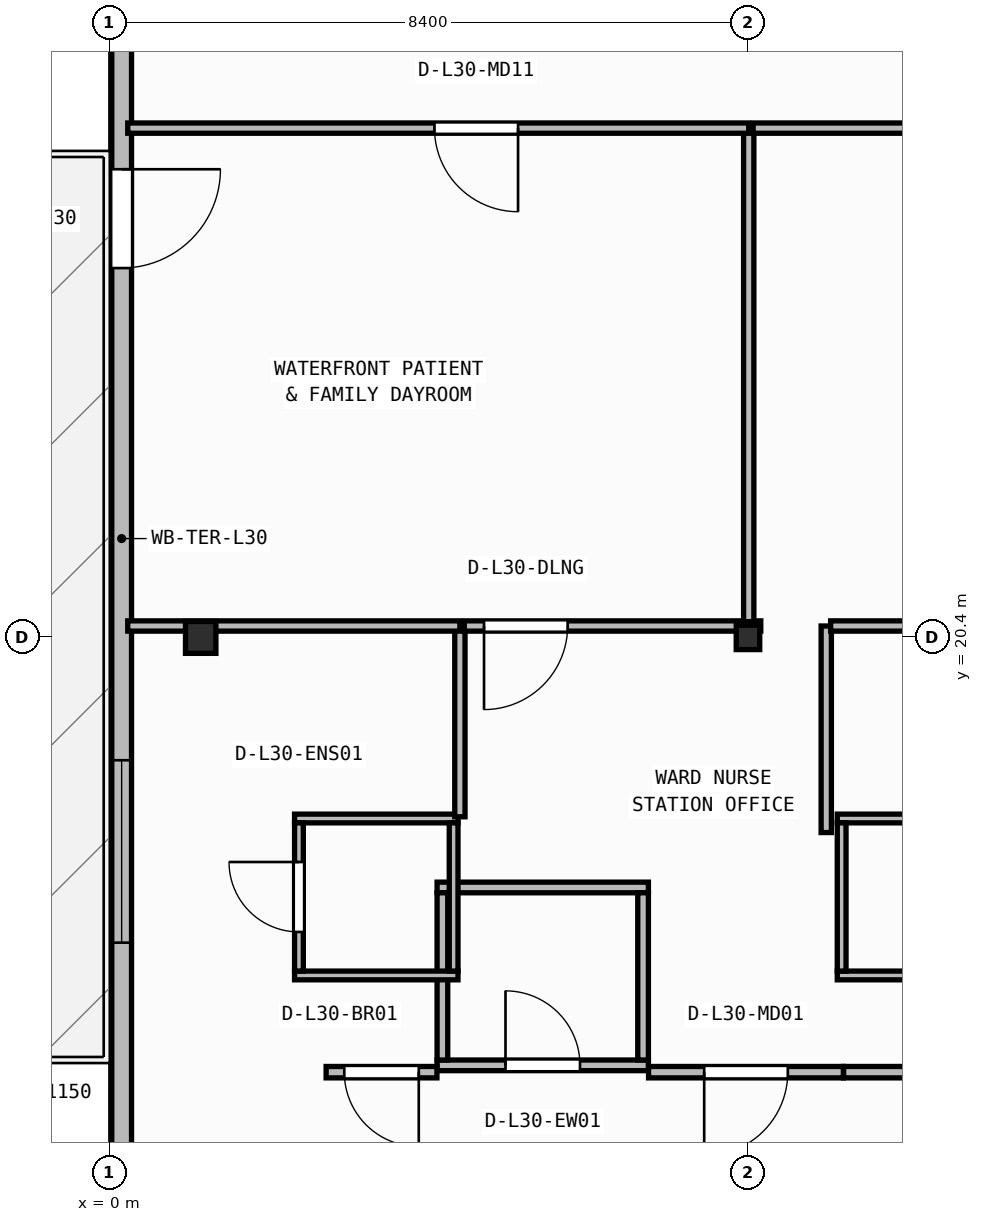
"""IFC4 building model, lengths in metres.
Left out: names, types, materials, properties, quantities, classifications, styles, units other than length and angle.
Written with IfcOpenShell. Run it as: python <this file> out.ifc"""

import sys

from ifc_helpers import new_model, si_unit, direction, frame, frame_2d, origin, origin_2d, place, context, subcontext, project, spatial, rectangle, i_section, extrude, element, fill, save


model = new_model("IFC4")
c1 = context("Model", 3, precision=1e-05, world=origin(), true_north=direction((0.0, 1.0)))
c2 = subcontext(c1, "Body", "Model", "MODEL_VIEW")
j1 = project(units=[si_unit("LENGTHUNIT", "METRE"), si_unit("PLANEANGLEUNIT", "RADIAN")], contexts=[c1])
p1 = place(None, origin())
s1 = spatial("IfcSite", under=j1, at=p1, CompositionType="ELEMENT")
p2 = place(p1, origin())
s2 = spatial("IfcBuilding", under=s1, at=p2, CompositionType="ELEMENT")
p3 = place(p2, frame((0.0, 0.0, 123.1)))
s3 = spatial("IfcBuildingStorey", under=s2, at=p3, CompositionType="ELEMENT", Elevation=123.1)
p4 = place(p3, frame((1.2, 20.4, 0.0), z_axis=(0.0, 0.0, 1.0), x_axis=(1.0, 0.0, 0.0)))
e1 = element("IfcColumn", 1, at=p4, inside=s3, PredefinedType="COLUMN", context=c2, shape_type="SweptSolid", body=[
    extrude(i_section(OverallWidth=0.4, OverallDepth=0.42, WebThickness=0.025, FlangeThickness=0.04, at=origin_2d()), origin(), (0.0, 0.0, 1.0), 3.95),
])
p5 = place(p3, frame((8.4, 20.4, 0.0), z_axis=(0.0, 0.0, 1.0), x_axis=(1.0, 0.0, 0.0)))
e2 = element("IfcColumn", 2, at=p5, inside=s3, PredefinedType="COLUMN", context=c2, shape_type="SweptSolid", body=[
    extrude(i_section(OverallWidth=0.309, OverallDepth=0.321, WebThickness=0.014, FlangeThickness=0.022, FilletRadius=0.017, at=origin_2d()), origin(), (0.0, 0.0, 1.0), 3.95),
])
p6 = place(p3, frame((0.16, 40.64, 0.0), z_axis=(0.0, 0.0, 1.0), x_axis=(0.0, -1.0, 0.0)))
e3 = element("IfcWall", 3, at=p6, inside=s3, PredefinedType="STANDARD", context=c2, shape_type="SweptSolid", body=[
    extrude(rectangle(XDim=37.88, YDim=0.26, at=frame_2d((18.94, 0.0))), origin(), (0.0, 0.0, 1.0), 3.71),
])
p7 = place(p6, frame((14.081, 0.0, 0.0)))
e4 = element("IfcOpeningElement", 4, at=p7, cuts=e3, PredefinedType="OPENING", context=c2, shape_type="SweptSolid", body=[
    extrude(rectangle(XDim=1.3, YDim=2.15, at=frame_2d((0.65, 1.075))), frame((0.0, 0.14, 0.0), z_axis=(0.0, -1.0, 0.0), x_axis=(1.0, 0.0, 0.0)), (0.0, 0.0, 1.0), 0.28),
])
p8 = place(p6, frame((21.856, 0.0, 0.9)))
e5 = element("IfcOpeningElement", 5, at=p8, cuts=e3, PredefinedType="OPENING", context=c2, shape_type="SweptSolid", body=[
    extrude(rectangle(XDim=2.4, YDim=1.65, at=frame_2d((1.2, 0.825))), frame((0.0, 0.14, 0.0), z_axis=(0.0, -1.0, 0.0), x_axis=(1.0, 0.0, 0.0)), (0.0, 0.0, 1.0), 0.28),
])
p9 = place(p3, frame((4.31, 14.77, 0.0), z_axis=(0.0, 0.0, 1.0), x_axis=(1.0, 0.0, 0.0)))
e6 = element("IfcWall", 6, at=p9, inside=s3, PredefinedType="PARTITIONING", context=c2, shape_type="SweptSolid", body=[
    extrude(rectangle(XDim=2.78, YDim=0.14, at=frame_2d((1.39, 0.0))), origin(), (0.0, 0.0, 1.0), 3.71),
])
p10 = place(p9, frame((0.9, 0.0, 0.0)))
e7 = element("IfcOpeningElement", 7, at=p10, cuts=e6, PredefinedType="OPENING", context=c2, shape_type="SweptSolid", body=[
    extrude(rectangle(XDim=0.98, YDim=2.1, at=frame_2d((0.49, 1.05))), frame((0.0, 0.08, 0.0), z_axis=(0.0, -1.0, 0.0), x_axis=(1.0, 0.0, 0.0)), (0.0, 0.0, 1.0), 0.16),
])
p11 = place(p3, frame((4.31, 17.11, 0.0), z_axis=(0.0, 0.0, 1.0), x_axis=(1.0, 0.0, 0.0)))
e8 = element("IfcWall", 8, at=p11, inside=s3, PredefinedType="PARTITIONING", context=c2, shape_type="SweptSolid", body=[
    extrude(rectangle(XDim=2.78, YDim=0.14, at=frame_2d((1.39, 0.0))), origin(), (0.0, 0.0, 1.0), 3.71),
])
for number, where, z_axis, x_axis in (
    (9, (4.38, 14.84, 0.0), (0.0, 0.0, 1.0), (0.0, 1.0, 0.0)),
    (10, (7.02, 14.84, 0.0), (0.0, 0.0, 1.0), (0.0, 1.0, 0.0)),
):
    element("IfcWall", number, at=place(p3, frame(where, z_axis=z_axis, x_axis=x_axis)), inside=s3, PredefinedType="PARTITIONING", context=c2, shape_type="SweptSolid", body=[
        extrude(rectangle(XDim=2.2, YDim=0.14, at=frame_2d((1.1, 0.0))), origin(), (0.0, 0.0, 1.0), 3.71),
    ])
for number, where, z_axis, x_axis in (
    (11, (2.435, 15.952, 0.0), (0.0, 0.0, 1.0), (1.0, 0.0, 0.0)),
    (12, (2.435, 18.018, 0.0), (0.0, 0.0, 1.0), (1.0, 0.0, 0.0)),
):
    element("IfcWall", number, at=place(p3, frame(where, z_axis=z_axis, x_axis=x_axis)), inside=s3, PredefinedType="PARTITIONING", context=c2, shape_type="SweptSolid", body=[
        extrude(rectangle(XDim=2.15, YDim=0.115, at=frame_2d((1.075, 0.0))), origin(), (0.0, 0.0, 1.0), 3.71),
    ])
p12 = place(p3, frame((2.492, 16.01, 0.0), z_axis=(0.0, 0.0, 1.0), x_axis=(0.0, 1.0, 0.0)))
e13 = element("IfcWall", 13, at=p12, inside=s3, PredefinedType="PARTITIONING", context=c2, shape_type="SweptSolid", body=[
    extrude(rectangle(XDim=1.95, YDim=0.115, at=frame_2d((0.975, 0.0))), origin(), (0.0, 0.0, 1.0), 3.71),
])
p13 = place(p12, frame((0.515, 0.0, 0.0)))
e14 = element("IfcOpeningElement", 14, at=p13, cuts=e13, PredefinedType="OPENING", context=c2, shape_type="SweptSolid", body=[
    extrude(rectangle(XDim=0.92, YDim=2.1, at=frame_2d((0.46, 1.05))), frame((0.0, 0.067, 0.0), z_axis=(0.0, -1.0, 0.0), x_axis=(1.0, 0.0, 0.0)), (0.0, 0.0, 1.0), 0.135),
])
p14 = place(p3, frame((4.528, 16.01, 0.0), z_axis=(0.0, 0.0, 1.0), x_axis=(0.0, 1.0, 0.0)))
e15 = element("IfcWall", 15, at=p14, inside=s3, PredefinedType="PARTITIONING", context=c2, shape_type="SweptSolid", body=[
    extrude(rectangle(XDim=1.95, YDim=0.115, at=frame_2d((0.975, 0.0))), origin(), (0.0, 0.0, 1.0), 3.71),
])
for number, where, z_axis, x_axis in (
    (16, (9.575, 15.952, 0.0), (0.0, 0.0, 1.0), (1.0, 0.0, 0.0)),
    (17, (9.575, 18.018, 0.0), (0.0, 0.0, 1.0), (1.0, 0.0, 0.0)),
):
    element("IfcWall", number, at=place(p3, frame(where, z_axis=z_axis, x_axis=x_axis)), inside=s3, PredefinedType="PARTITIONING", context=c2, shape_type="SweptSolid", body=[
        extrude(rectangle(XDim=2.15, YDim=0.115, at=frame_2d((1.075, 0.0))), origin(), (0.0, 0.0, 1.0), 3.71),
    ])
p15 = place(p3, frame((9.633, 16.01, 0.0), z_axis=(0.0, 0.0, 1.0), x_axis=(0.0, 1.0, 0.0)))
e18 = element("IfcWall", 18, at=p15, inside=s3, PredefinedType="PARTITIONING", context=c2, shape_type="SweptSolid", body=[
    extrude(rectangle(XDim=1.95, YDim=0.115, at=frame_2d((0.975, 0.0))), origin(), (0.0, 0.0, 1.0), 3.71),
])
p16 = place(p3, frame((4.308, 14.68, 0.0), z_axis=(0.0, 0.0, 1.0), x_axis=(-1.0, 0.0, 0.0)))
e19 = element("IfcWall", 19, at=p16, inside=s3, PredefinedType="PARTITIONING", context=c2, shape_type="SweptSolid", body=[
    extrude(rectangle(XDim=1.458, YDim=0.15, at=frame_2d((0.729, 0.0))), origin(), (0.0, 0.0, 1.0), 3.71),
])
p17 = place(p16, frame((0.239, 0.0, 0.0)))
e20 = element("IfcOpeningElement", 20, at=p17, cuts=e19, PredefinedType="OPENING", context=c2, shape_type="SweptSolid", body=[
    extrude(rectangle(XDim=0.98, YDim=2.1, at=frame_2d((0.49, 1.05))), frame((0.0, 0.085, 0.0), z_axis=(0.0, -1.0, 0.0), x_axis=(1.0, 0.0, 0.0)), (0.0, 0.0, 1.0), 0.17),
])
p18 = place(p3, frame((9.656, 14.68, 0.0), z_axis=(0.0, 0.0, 1.0), x_axis=(-1.0, 0.0, 0.0)))
e21 = element("IfcWall", 21, at=p18, inside=s3, PredefinedType="PARTITIONING", context=c2, shape_type="SweptSolid", body=[
    extrude(rectangle(XDim=2.564, YDim=0.15, at=frame_2d((1.282, 0.0))), origin(), (0.0, 0.0, 1.0), 3.71),
])
p19 = place(p18, frame((0.732, 0.0, 0.0)))
e22 = element("IfcOpeningElement", 22, at=p19, cuts=e21, PredefinedType="OPENING", context=c2, shape_type="SweptSolid", body=[
    extrude(rectangle(XDim=1.1, YDim=2.1, at=frame_2d((0.55, 1.05))), frame((0.0, 0.085, 0.0), z_axis=(0.0, -1.0, 0.0), x_axis=(1.0, 0.0, 0.0)), (0.0, 0.0, 1.0), 0.17),
])
p20 = place(p3, frame((14.856, 14.68, 0.0), z_axis=(0.0, 0.0, 1.0), x_axis=(-1.0, 0.0, 0.0)))
e23 = element("IfcWall", 23, at=p20, inside=s3, PredefinedType="PARTITIONING", context=c2, shape_type="SweptSolid", body=[
    extrude(rectangle(XDim=5.198, YDim=0.15, at=frame_2d((2.599, 0.0))), origin(), (0.0, 0.0, 1.0), 3.71),
])
p21 = place(p20, frame((1.949, 0.0, 0.0)))
e24 = element("IfcOpeningElement", 24, at=p21, cuts=e23, PredefinedType="OPENING", context=c2, shape_type="SweptSolid", body=[
    extrude(rectangle(XDim=1.3, YDim=2.15, at=frame_2d((0.65, 1.075))), frame((0.0, 0.085, 0.0), z_axis=(0.0, -1.0, 0.0), x_axis=(1.0, 0.0, 0.0)), (0.0, 0.0, 1.0), 0.17),
])
p22 = place(p3, frame((4.61, 18.04, 0.0), z_axis=(0.0, 0.0, 1.0), x_axis=(0.0, 1.0, 0.0)))
e25 = element("IfcWall", 25, at=p22, inside=s3, PredefinedType="PARTITIONING", context=c2, shape_type="SweptSolid", body=[
    extrude(rectangle(XDim=2.51, YDim=0.135, at=frame_2d((1.255, 0.0))), origin(), (0.0, 0.0, 1.0), 3.71),
])
p23 = place(p3, frame((4.61, 20.55, 0.0), z_axis=(0.0, 0.0, 1.0), x_axis=(-1.0, 0.0, 0.0)))
e26 = element("IfcWall", 26, at=p23, inside=s3, PredefinedType="PARTITIONING", context=c2, shape_type="SweptSolid", body=[
    extrude(rectangle(XDim=4.37, YDim=0.135, at=frame_2d((2.185, 0.0))), origin(), (0.0, 0.0, 1.0), 3.083),
])
p24 = place(p3, frame((9.43, 17.833, 0.0), z_axis=(0.0, 0.0, 1.0), x_axis=(0.0, 1.0, 0.0)))
e27 = element("IfcWall", 27, at=p24, inside=s3, PredefinedType="PARTITIONING", context=c2, shape_type="SweptSolid", body=[
    extrude(rectangle(XDim=2.718, YDim=0.135, at=frame_2d((1.359, 0.0))), origin(), (0.0, 0.0, 1.0), 3.71),
])
p25 = place(p3, frame((8.568, 20.55, 0.0), z_axis=(0.0, 0.0, 1.0), x_axis=(-1.0, 0.0, 0.0)))
e28 = element("IfcWall", 28, at=p25, inside=s3, PredefinedType="PARTITIONING", context=c2, shape_type="SweptSolid", body=[
    extrude(rectangle(XDim=3.901, YDim=0.135, at=frame_2d((1.95, 0.0))), origin(), (0.0, 0.0, 1.0), 3.083),
])
p26 = place(p25, frame((2.541, 0.0, 0.0)))
e29 = element("IfcOpeningElement", 29, at=p26, cuts=e28, PredefinedType="OPENING", context=c2, shape_type="SweptSolid", body=[
    extrude(rectangle(XDim=1.1, YDim=2.1, at=frame_2d((0.55, 1.05))), frame((0.0, 0.077, 0.0), z_axis=(0.0, -1.0, 0.0), x_axis=(1.0, 0.0, 0.0)), (0.0, 0.0, 1.0), 0.155),
])
p27 = place(p3, frame((14.63, 20.55, 0.0), z_axis=(0.0, 0.0, 1.0), x_axis=(-1.0, 0.0, 0.0)))
e30 = element("IfcWall", 30, at=p27, inside=s3, PredefinedType="PARTITIONING", context=c2, shape_type="SweptSolid", body=[
    extrude(rectangle(XDim=5.142, YDim=0.135, at=frame_2d((2.571, 0.0))), origin(), (0.0, 0.0, 1.0), 3.083),
])
p28 = place(p3, frame((8.41, 20.607, 0.0), z_axis=(0.0, 0.0, 1.0), x_axis=(0.0, 1.0, 0.0)))
e31 = element("IfcWall", 31, at=p28, inside=s3, PredefinedType="PARTITIONING", context=c2, shape_type="SweptSolid", body=[
    extrude(rectangle(XDim=6.493, YDim=0.135, at=frame_2d((3.246, 0.0))), origin(), (0.0, 0.0, 1.0), 3.152),
])
p29 = place(p3, frame((8.41, 27.1, 0.0), z_axis=(0.0, 0.0, 1.0), x_axis=(-1.0, 0.0, 0.0)))
e32 = element("IfcWall", 32, at=p29, inside=s3, PredefinedType="PARTITIONING", context=c2, shape_type="SweptSolid", body=[
    extrude(rectangle(XDim=8.17, YDim=0.135, at=frame_2d((4.085, 0.0))), origin(), (0.0, 0.0, 1.0), 3.71),
])
p30 = place(p29, frame((3.035, 0.0, 0.0)))
e33 = element("IfcOpeningElement", 33, at=p30, cuts=e32, PredefinedType="OPENING", context=c2, shape_type="SweptSolid", body=[
    extrude(rectangle(XDim=1.1, YDim=2.1, at=frame_2d((0.55, 1.05))), frame((0.0, 0.077, 0.0), z_axis=(0.0, -1.0, 0.0), x_axis=(1.0, 0.0, 0.0)), (0.0, 0.0, 1.0), 0.155),
])
p31 = place(p3, frame((19.135, 27.1, 0.0), z_axis=(0.0, 0.0, 1.0), x_axis=(-1.0, 0.0, 0.0)))
e34 = element("IfcWall", 34, at=p31, inside=s3, PredefinedType="PARTITIONING", context=c2, shape_type="SweptSolid", body=[
    extrude(rectangle(XDim=10.667, YDim=0.135, at=frame_2d((5.334, 0.0))), origin(), (0.0, 0.0, 1.0), 3.71),
])
p32 = place(p7, origin())
e35 = element("IfcDoor", 35, at=p32, inside=s3, OperationType="SINGLE_SWING_LEFT", PredefinedType="DOOR", context=c2, shape_type="SweptSolid", body=[
    extrude(rectangle(XDim=1.3, YDim=2.15, at=frame_2d((0.65, 1.075))), frame((0.0, 0.025, 0.0), z_axis=(0.0, -1.0, 0.0), x_axis=(1.0, 0.0, 0.0)), (0.0, 0.0, 1.0), 0.05),
])
fill(e4, e35)
p33 = place(p10, origin())
e36 = element("IfcDoor", 36, at=p33, inside=s3, OperationType="SINGLE_SWING_LEFT", PredefinedType="DOOR", context=c2, shape_type="SweptSolid", body=[
    extrude(rectangle(XDim=0.98, YDim=2.1, at=frame_2d((0.49, 1.05))), frame((0.0, 0.025, 0.0), z_axis=(0.0, -1.0, 0.0), x_axis=(1.0, 0.0, 0.0)), (0.0, 0.0, 1.0), 0.05),
])
fill(e7, e36)
p34 = place(p13, origin())
e37 = element("IfcDoor", 37, at=p34, inside=s3, OperationType="SINGLE_SWING_RIGHT", PredefinedType="DOOR", context=c2, shape_type="SweptSolid", body=[
    extrude(rectangle(XDim=0.92, YDim=2.1, at=frame_2d((0.46, 1.05))), frame((0.0, 0.025, 0.0), z_axis=(0.0, -1.0, 0.0), x_axis=(1.0, 0.0, 0.0)), (0.0, 0.0, 1.0), 0.05),
])
fill(e14, e37)
p35 = place(p17, origin())
e38 = element("IfcDoor", 38, at=p35, inside=s3, OperationType="SINGLE_SWING_LEFT", PredefinedType="DOOR", context=c2, shape_type="SweptSolid", body=[
    extrude(rectangle(XDim=0.98, YDim=2.1, at=frame_2d((0.49, 1.05))), frame((0.0, 0.025, 0.0), z_axis=(0.0, -1.0, 0.0), x_axis=(1.0, 0.0, 0.0)), (0.0, 0.0, 1.0), 0.05),
])
fill(e20, e38)
p36 = place(p19, origin())
e39 = element("IfcDoor", 39, at=p36, inside=s3, OperationType="SINGLE_SWING_RIGHT", PredefinedType="DOOR", context=c2, shape_type="SweptSolid", body=[
    extrude(rectangle(XDim=1.1, YDim=2.1, at=frame_2d((0.55, 1.05))), frame((0.0, 0.025, 0.0), z_axis=(0.0, -1.0, 0.0), x_axis=(1.0, 0.0, 0.0)), (0.0, 0.0, 1.0), 0.05),
])
fill(e22, e39)
p37 = place(p26, origin())
e40 = element("IfcDoor", 40, at=p37, inside=s3, OperationType="SINGLE_SWING_RIGHT", PredefinedType="DOOR", context=c2, shape_type="SweptSolid", body=[
    extrude(rectangle(XDim=1.1, YDim=2.1, at=frame_2d((0.55, 1.05))), frame((0.0, 0.025, 0.0), z_axis=(0.0, -1.0, 0.0), x_axis=(1.0, 0.0, 0.0)), (0.0, 0.0, 1.0), 0.05),
])
fill(e29, e40)
p38 = place(p30, origin())
e41 = element("IfcDoor", 41, at=p38, inside=s3, OperationType="SINGLE_SWING_LEFT", PredefinedType="DOOR", context=c2, shape_type="SweptSolid", body=[
    extrude(rectangle(XDim=1.1, YDim=2.1, at=frame_2d((0.55, 1.05))), frame((0.0, 0.025, 0.0), z_axis=(0.0, -1.0, 0.0), x_axis=(1.0, 0.0, 0.0)), (0.0, 0.0, 1.0), 0.05),
])
fill(e33, e41)
p39 = place(p8, origin())
e42 = element("IfcWindow", 42, at=p39, inside=s3, PartitioningType="SINGLE_PANEL", PredefinedType="WINDOW", context=c2, shape_type="SweptSolid", body=[
    extrude(rectangle(XDim=2.4, YDim=1.65, at=frame_2d((1.2, 0.825))), frame((0.0, 0.03, 0.0), z_axis=(0.0, -1.0, 0.0), x_axis=(1.0, 0.0, 0.0)), (0.0, 0.0, 1.0), 0.06),
])
fill(e5, e42)
save(model, sys.argv[1])
